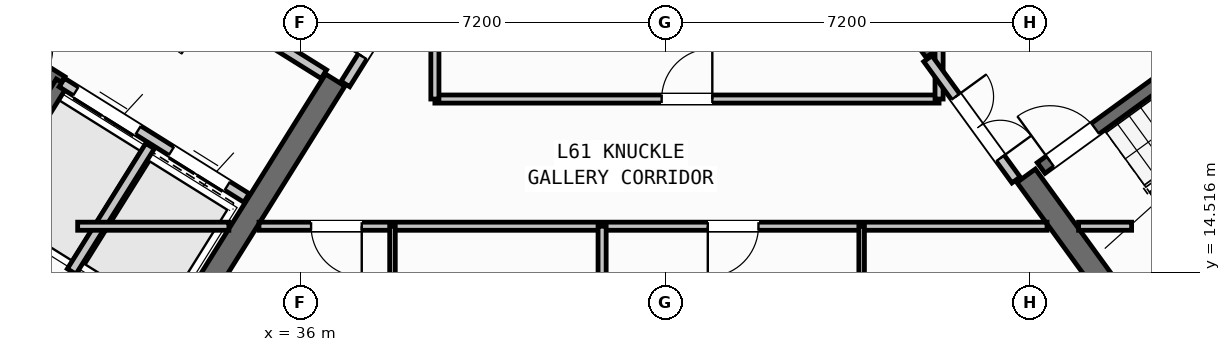
"""IFC4 building model, lengths in metres.
Left out: names, types, materials, properties, quantities, classifications, styles, units other than length and angle.
Written with IfcOpenShell. Run it as: python <this file> out.ifc"""

import sys

from ifc_helpers import new_model, si_unit, direction, frame, frame_2d, origin, place, context, subcontext, project, spatial, rectangle, extrude, source, transform, mapped, element, fill, save


model = new_model("IFC4")
c1 = context("Model", 3, precision=1e-05, world=origin(), true_north=direction((0.0, 1.0)))
c2 = subcontext(c1, "Body", "Model", "MODEL_VIEW")
j1 = project(units=[si_unit("LENGTHUNIT", "METRE"), si_unit("PLANEANGLEUNIT", "RADIAN")], contexts=[c1])
p1 = place(None, origin())
s1 = spatial("IfcSite", under=j1, at=p1, CompositionType="ELEMENT")
p2 = place(p1, origin())
s2 = spatial("IfcBuilding", under=s1, at=p2, CompositionType="ELEMENT")
p3 = place(p2, frame((0.0, 0.0, 242.1)))
s3 = spatial("IfcBuildingStorey", under=s2, at=p3, CompositionType="ELEMENT", Elevation=242.1)
p4 = place(p3, frame((33.324, 12.503, 0.0), z_axis=(0.0, 0.0, 1.0), x_axis=(-0.848043529849, 0.529926571782, 0.0)))
e1 = element("IfcWall", 1, at=p4, inside=s3, PredefinedType="SHEAR", context=c2, shape_type="SweptSolid", body=[
    extrude(rectangle(XDim=13.04, YDim=0.45, at=frame_2d((6.52, 0.0))), origin(), (0.0, 0.0, 1.0), 3.32),
])
p5 = place(p3, frame((36.683, 18.304, 0.0), z_axis=(0.0, 0.0, 1.0), x_axis=(-0.529904039071, -0.848057609704, 0.0)))
e2 = element("IfcWall", 2, at=p5, inside=s3, PredefinedType="SHEAR", context=c2, shape_type="SweptSolid", body=[
    extrude(rectangle(XDim=6.475, YDim=0.45, at=frame_2d((3.238, 0.0))), origin(), (0.0, 0.0, 1.0), 3.32),
])
p6 = place(p3, frame((52.399, 13.169, 0.0), z_axis=(0.0, 0.0, 1.0), x_axis=(0.809022352778, 0.587777877013, 0.0)))
e3 = element("IfcWall", 3, at=p6, inside=s3, PredefinedType="SHEAR", context=c2, shape_type="SweptSolid", body=[
    extrude(rectangle(XDim=12.24, YDim=0.45, at=frame_2d((6.12, 0.0))), origin(), (0.0, 0.0, 1.0), 3.32),
])
p7 = place(p3, frame((52.449, 13.483, 0.0), z_axis=(0.0, 0.0, 1.0), x_axis=(-0.587819244441, 0.808992296542, 0.0)))
e4 = element("IfcWall", 4, at=p7, inside=s3, PredefinedType="SHEAR", context=c2, shape_type="SweptSolid", body=[
    extrude(rectangle(XDim=3.625, YDim=0.45, at=frame_2d((1.812, 0.0))), origin(), (0.0, 0.0, 1.0), 3.32),
])
p8 = place(p3, frame((48.526, 18.884, 0.0), z_axis=(0.0, 0.0, 1.0), x_axis=(-0.587774812919, 0.809024578921, 0.0)))
e5 = element("IfcWall", 5, at=p8, inside=s3, PredefinedType="SHEAR", context=c2, shape_type="SweptSolid", body=[
    extrude(rectangle(XDim=6.475, YDim=0.45, at=frame_2d((3.238, 0.0))), origin(), (0.0, 0.0, 1.0), 3.32),
])
p9 = place(p3, frame((31.28, 18.261, 0.0), z_axis=(0.0, 0.0, 1.0), x_axis=(-0.848051618787, 0.529913626805, 0.0)))
e6 = element("IfcWall", 6, at=p9, inside=s3, PredefinedType="SHEAR", context=c2, shape_type="SweptSolid", body=[
    extrude(rectangle(XDim=7.46, YDim=0.26, at=frame_2d((3.73, 0.0))), origin(), (0.0, 0.0, 1.0), 3.32),
])
p10 = place(p9, frame((0.36, 0.0, 0.0)))
e7 = element("IfcOpeningElement", 7, at=p10, cuts=e6, PredefinedType="OPENING", context=c2, shape_type="SweptSolid", body=[
    extrude(rectangle(XDim=0.86, YDim=2.05, at=frame_2d((0.43, 1.025))), frame((0.0, 0.14, 0.0), z_axis=(0.0, -1.0, 0.0), x_axis=(1.0, 0.0, 0.0)), (0.0, 0.0, 1.0), 0.28),
])
p11 = place(p3, frame((31.288, 18.256, 0.0), z_axis=(0.0, 0.0, 1.0), x_axis=(-0.529943379326, -0.848033026897, 0.0)))
e8 = element("IfcWall", 8, at=p11, inside=s3, PredefinedType="SHEAR", context=c2, shape_type="SweptSolid", body=[
    extrude(rectangle(XDim=3.16, YDim=0.26, at=frame_2d((1.58, 0.0))), origin(), (0.0, 0.0, 1.0), 3.32),
])
p12 = place(p3, frame((34.933, 15.978, 0.0), z_axis=(0.0, 0.0, 1.0), x_axis=(-0.848055739377, 0.529907032327, 0.0)))
e9 = element("IfcWall", 9, at=p12, inside=s3, PredefinedType="STANDARD", context=c2, shape_type="SweptSolid", body=[
    extrude(rectangle(XDim=4.298, YDim=0.2, at=frame_2d((2.149, 0.0))), origin(), (0.0, 0.0, 1.0), 3.31),
])
p13 = place(p12, frame((0.448, 0.0, 0.0)))
e10 = element("IfcOpeningElement", 10, at=p13, cuts=e9, PredefinedType="OPENING", context=c2, shape_type="SweptSolid", body=[
    extrude(rectangle(XDim=1.3, YDim=2.2, at=frame_2d((0.65, 1.1))), frame((0.0, 0.11, 0.0), z_axis=(0.0, -1.0, 0.0), x_axis=(1.0, 0.0, 0.0)), (0.0, 0.0, 1.0), 0.22),
])
p14 = place(p12, frame((2.523, 0.0, 0.0)))
e11 = element("IfcOpeningElement", 11, at=p14, cuts=e9, PredefinedType="OPENING", context=c2, shape_type="SweptSolid", body=[
    extrude(rectangle(XDim=1.45, YDim=2.25, at=frame_2d((0.725, 1.125))), frame((0.0, 0.11, 0.0), z_axis=(0.0, -1.0, 0.0), x_axis=(1.0, 0.0, 0.0)), (0.0, 0.0, 1.0), 0.22),
])
p15 = place(p3, frame((36.459, 18.421, 0.0), z_axis=(0.0, 0.0, 1.0), x_axis=(-0.848059591691, 0.529900867089, 0.0)))
e12 = element("IfcWall", 12, at=p15, inside=s3, PredefinedType="STANDARD", context=c2, shape_type="SweptSolid", body=[
    extrude(rectangle(XDim=5.818, YDim=0.2, at=frame_2d((2.909, 0.0))), origin(), (0.0, 0.0, 1.0), 3.31),
])
p16 = place(p15, frame((2.598, 0.0, 0.0)))
e13 = element("IfcOpeningElement", 13, at=p16, cuts=e12, PredefinedType="OPENING", context=c2, shape_type="SweptSolid", body=[
    extrude(rectangle(XDim=1.15, YDim=2.1, at=frame_2d((0.575, 1.05))), frame((0.0, 0.11, 0.0), z_axis=(0.0, -1.0, 0.0), x_axis=(1.0, 0.0, 0.0)), (0.0, 0.0, 1.0), 0.22),
])
p17 = place(p3, frame((33.029, 17.003, 0.0), z_axis=(0.0, 0.0, 1.0), x_axis=(-0.529916267533, -0.848049968695, 0.0)))
e14 = element("IfcWall", 14, at=p17, inside=s3, PredefinedType="STANDARD", context=c2, shape_type="SweptSolid", body=[
    extrude(rectangle(XDim=2.92, YDim=0.2, at=frame_2d((1.46, 0.0))), origin(), (0.0, 0.0, 1.0), 3.31),
])
p18 = place(p3, frame((52.472, 14.013, 0.0), z_axis=(0.0, 0.0, 1.0), x_axis=(0.809028366311, 0.587769599847, 0.0)))
e15 = element("IfcWall", 15, at=p18, inside=s3, PredefinedType="SHEAR", context=c2, shape_type="SweptSolid", body=[
    extrude(rectangle(XDim=7.33, YDim=0.26, at=frame_2d((3.665, 0.0))), origin(), (0.0, 0.0, 1.0), 3.32),
])
p19 = place(p3, frame((50.615, 16.57, 0.0), z_axis=(0.0, 0.0, 1.0), x_axis=(0.809028366311, 0.587769599847, 0.0)))
e16 = element("IfcWall", 16, at=p19, inside=s3, PredefinedType="SHEAR", context=c2, shape_type="SweptSolid", body=[
    extrude(rectangle(XDim=7.33, YDim=0.26, at=frame_2d((3.665, 0.0))), origin(), (0.0, 0.0, 1.0), 3.32),
])
p20 = place(p19, frame((0.22, 0.0, 0.0)))
e17 = element("IfcOpeningElement", 17, at=p20, cuts=e16, PredefinedType="OPENING", context=c2, shape_type="SweptSolid", body=[
    extrude(rectangle(XDim=1.1, YDim=2.1, at=frame_2d((0.55, 1.05))), frame((0.0, 0.14, 0.0), z_axis=(0.0, -1.0, 0.0), x_axis=(1.0, 0.0, 0.0)), (0.0, 0.0, 1.0), 0.28),
])
p21 = place(p3, frame((32.164, 10.374, 0.0), z_axis=(0.0, 0.0, 1.0), x_axis=(-0.848044107957, 0.529925646633, 0.0)))
e18 = element("IfcWall", 18, at=p21, inside=s3, PredefinedType="PARTITIONING", context=c2, shape_type="SweptSolid", body=[
    extrude(rectangle(XDim=15.57, YDim=0.16, at=frame_2d((7.785, 0.0))), origin(), (0.0, 0.0, 1.0), 3.31),
])
p22 = place(p21, frame((10.83, 0.0, 0.0)))
e19 = element("IfcOpeningElement", 19, at=p22, cuts=e18, PredefinedType="OPENING", context=c2, shape_type="SweptSolid", body=[
    extrude(rectangle(XDim=1.0, YDim=2.1, at=frame_2d((0.5, 1.05))), frame((0.0, 0.09, 0.0), z_axis=(0.0, -1.0, 0.0), x_axis=(1.0, 0.0, 0.0)), (0.0, 0.0, 1.0), 0.18),
])
p23 = place(p3, frame((38.451, 20.737, 0.0), z_axis=(0.0, 0.0, 1.0), x_axis=(-0.529924799939, -0.848044637038, 0.0)))
e20 = element("IfcWall", 20, at=p23, inside=s3, PredefinedType="STANDARD", context=c2, shape_type="SweptSolid", body=[
    extrude(rectangle(XDim=2.96, YDim=0.2, at=frame_2d((1.48, 0.0))), origin(), (0.0, 0.0, 1.0), 3.31),
])
p24 = place(p23, frame((1.46, 0.0, 0.0)))
e21 = element("IfcOpeningElement", 21, at=p24, cuts=e20, PredefinedType="OPENING", context=c2, shape_type="SweptSolid", body=[
    extrude(rectangle(XDim=0.86, YDim=2.05, at=frame_2d((0.43, 1.025))), frame((0.0, 0.11, 0.0), z_axis=(0.0, -1.0, 0.0), x_axis=(1.0, 0.0, 0.0)), (0.0, 0.0, 1.0), 0.22),
])
p25 = place(p3, frame((31.6, 15.42, 0.0), z_axis=(0.0, 0.0, 1.0), x_axis=(1.0, 0.0, 0.0)))
e22 = element("IfcWall", 22, at=p25, inside=s3, PredefinedType="PARTITIONING", context=c2, shape_type="SweptSolid", body=[
    extrude(rectangle(XDim=2.984, YDim=0.16, at=frame_2d((1.492, 0.0))), origin(), (0.0, 0.0, 1.0), 3.31),
])
p26 = place(p3, frame((35.178, 15.42, 0.0), z_axis=(0.0, 0.0, 1.0), x_axis=(1.0, 0.0, 0.0)))
e23 = element("IfcWall", 23, at=p26, inside=s3, PredefinedType="PARTITIONING", context=c2, shape_type="SweptSolid", body=[
    extrude(rectangle(XDim=15.552, YDim=0.16, at=frame_2d((7.776, 0.0))), origin(), (0.0, 0.0, 1.0), 3.31),
])
p27 = place(p26, frame((1.028, 0.0, 0.0)))
e24 = element("IfcOpeningElement", 24, at=p27, cuts=e23, PredefinedType="OPENING", context=c2, shape_type="SweptSolid", body=[
    extrude(rectangle(XDim=1.0, YDim=2.1, at=frame_2d((0.5, 1.05))), frame((0.0, 0.09, 0.0), z_axis=(0.0, -1.0, 0.0), x_axis=(1.0, 0.0, 0.0)), (0.0, 0.0, 1.0), 0.18),
])
p28 = place(p26, frame((8.858, 0.0, 0.0)))
e25 = element("IfcOpeningElement", 25, at=p28, cuts=e23, PredefinedType="OPENING", context=c2, shape_type="SweptSolid", body=[
    extrude(rectangle(XDim=1.0, YDim=2.1, at=frame_2d((0.5, 1.05))), frame((0.0, 0.09, 0.0), z_axis=(0.0, -1.0, 0.0), x_axis=(1.0, 0.0, 0.0)), (0.0, 0.0, 1.0), 0.18),
])
p29 = place(p3, frame((51.354, 15.42, 0.0), z_axis=(0.0, 0.0, 1.0), x_axis=(1.0, 0.0, 0.0)))
e26 = element("IfcWall", 26, at=p29, inside=s3, PredefinedType="PARTITIONING", context=c2, shape_type="SweptSolid", body=[
    extrude(rectangle(XDim=1.046, YDim=0.16, at=frame_2d((0.523, 0.0))), origin(), (0.0, 0.0, 1.0), 3.31),
])
p30 = place(p3, frame((38.65, 17.93, 0.0), z_axis=(0.0, 0.0, 1.0), x_axis=(1.0, 0.0, 0.0)))
e27 = element("IfcWall", 27, at=p30, inside=s3, PredefinedType="PARTITIONING", context=c2, shape_type="SweptSolid", body=[
    extrude(rectangle(XDim=9.95, YDim=0.16, at=frame_2d((4.975, 0.0))), origin(), (0.0, 0.0, 1.0), 3.31),
])
p31 = place(p30, frame((4.475, 0.0, 0.0)))
e28 = element("IfcOpeningElement", 28, at=p31, cuts=e27, PredefinedType="OPENING", context=c2, shape_type="SweptSolid", body=[
    extrude(rectangle(XDim=1.0, YDim=2.1, at=frame_2d((0.5, 1.05))), frame((0.0, 0.09, 0.0), z_axis=(0.0, -1.0, 0.0), x_axis=(1.0, 0.0, 0.0)), (0.0, 0.0, 1.0), 0.18),
])
p32 = place(p3, frame((38.65, 17.93, 0.0), z_axis=(0.0, 0.0, 1.0), x_axis=(0.0, 1.0, 0.0)))
e29 = element("IfcWall", 29, at=p32, inside=s3, PredefinedType="PARTITIONING", context=c2, shape_type="SweptSolid", body=[
    extrude(rectangle(XDim=3.046, YDim=0.16, at=frame_2d((1.523, 0.0))), origin(), (0.0, 0.0, 1.0), 3.31),
])
p33 = place(p3, frame((48.6, 17.93, 0.0), z_axis=(0.0, 0.0, 1.0), x_axis=(0.0, 1.0, 0.0)))
e30 = element("IfcWall", 30, at=p33, inside=s3, PredefinedType="PARTITIONING", context=c2, shape_type="SweptSolid", body=[
    extrude(rectangle(XDim=0.993, YDim=0.16, at=frame_2d((0.496, 0.0))), origin(), (0.0, 0.0, 1.0), 3.31),
])
p34 = place(p3, frame((50.119, 16.333, 0.0), z_axis=(0.0, 0.0, 1.0), x_axis=(-0.587749856981, 0.809042709391, 0.0)))
e31 = element("IfcWall", 31, at=p34, inside=s3, PredefinedType="STANDARD", context=c2, shape_type="SweptSolid", body=[
    extrude(rectangle(XDim=2.96, YDim=0.2, at=frame_2d((1.48, 0.0))), origin(), (0.0, 0.0, 1.0), 3.31),
])
p35 = place(p34, frame((0.53, 0.0, 0.0)))
e32 = element("IfcOpeningElement", 32, at=p35, cuts=e31, PredefinedType="OPENING", context=c2, shape_type="SweptSolid", body=[
    extrude(rectangle(XDim=1.5, YDim=2.15, at=frame_2d((0.75, 1.075))), frame((0.0, 0.11, 0.0), z_axis=(0.0, -1.0, 0.0), x_axis=(1.0, 0.0, 0.0)), (0.0, 0.0, 1.0), 0.22),
])
p36 = place(p3, frame((41.95, 1.96, 0.0), z_axis=(0.0, 0.0, 1.0), x_axis=(0.0, 1.0, 0.0)))
e33 = element("IfcWall", 33, at=p36, inside=s3, PredefinedType="PARTITIONING", context=c2, shape_type="SweptSolid", body=[
    extrude(rectangle(XDim=13.46, YDim=0.16, at=frame_2d((6.73, 0.0))), origin(), (0.0, 0.0, 1.0), 3.31),
])
p37 = place(p3, frame((37.813, 1.96, 0.0), z_axis=(0.0, 0.0, 1.0), x_axis=(0.0, 1.0, 0.0)))
e34 = element("IfcWall", 34, at=p37, inside=s3, PredefinedType="PARTITIONING", context=c2, shape_type="SweptSolid", body=[
    extrude(rectangle(XDim=13.46, YDim=0.11, at=frame_2d((6.73, 0.0))), origin(), (0.0, 0.0, 1.0), 3.31),
])
p38 = place(p37, frame((5.5, 0.0, 0.0)))
e35 = element("IfcOpeningElement", 35, at=p38, cuts=e34, PredefinedType="OPENING", context=c2, shape_type="SweptSolid", body=[
    extrude(rectangle(XDim=0.92, YDim=2.08, at=frame_2d((0.46, 1.04))), frame((0.0, 0.065, 0.0), z_axis=(0.0, -1.0, 0.0), x_axis=(1.0, 0.0, 0.0)), (0.0, 0.0, 1.0), 0.13),
])
p39 = place(p37, frame((10.89, 0.0, 0.0)))
e36 = element("IfcOpeningElement", 36, at=p39, cuts=e34, PredefinedType="OPENING", context=c2, shape_type="SweptSolid", body=[
    extrude(rectangle(XDim=0.88, YDim=2.08, at=frame_2d((0.44, 1.04))), frame((0.0, 0.065, 0.0), z_axis=(0.0, -1.0, 0.0), x_axis=(1.0, 0.0, 0.0)), (0.0, 0.0, 1.0), 0.13),
])
p40 = place(p3, frame((47.072, 1.96, 0.0), z_axis=(0.0, 0.0, 1.0), x_axis=(0.0, 1.0, 0.0)))
e37 = element("IfcWall", 37, at=p40, inside=s3, PredefinedType="PARTITIONING", context=c2, shape_type="SweptSolid", body=[
    extrude(rectangle(XDim=13.46, YDim=0.11, at=frame_2d((6.73, 0.0))), origin(), (0.0, 0.0, 1.0), 3.31),
])
p41 = place(p40, frame((6.6, 0.0, 0.0)))
e38 = element("IfcOpeningElement", 38, at=p41, cuts=e37, PredefinedType="OPENING", context=c2, shape_type="SweptSolid", body=[
    extrude(rectangle(XDim=0.92, YDim=2.08, at=frame_2d((0.46, 1.04))), frame((0.0, 0.065, 0.0), z_axis=(0.0, -1.0, 0.0), x_axis=(1.0, 0.0, 0.0)), (0.0, 0.0, 1.0), 0.13),
])
p42 = place(p40, frame((11.54, 0.0, 0.0)))
e39 = element("IfcOpeningElement", 39, at=p42, cuts=e37, PredefinedType="OPENING", context=c2, shape_type="SweptSolid", body=[
    extrude(rectangle(XDim=0.88, YDim=2.08, at=frame_2d((0.44, 1.04))), frame((0.0, 0.065, 0.0), z_axis=(0.0, -1.0, 0.0), x_axis=(1.0, 0.0, 0.0)), (0.0, 0.0, 1.0), 0.13),
])
m1 = source(origin(), c2, "Body", "SweptSolid", [
    extrude(rectangle(XDim=1.3, YDim=2.2, at=frame_2d((0.65, 1.1))), frame((0.0, 0.025, 0.0), z_axis=(0.0, -1.0, 0.0), x_axis=(1.0, 0.0, 0.0)), (0.0, 0.0, 1.0), 0.05),
])
p43 = place(p13, origin())
e40 = element("IfcDoor", 40, at=p43, inside=s3, OperationType="DOUBLE_DOOR_SLIDING", PredefinedType="DOOR", context=c2, shape_type="MappedRepresentation", body=[
    mapped(m1, transform((0.0, 0.0, 0.0), scale=1.0)),
])
fill(e10, e40)
m2 = source(origin(), c2, "Body", "SweptSolid", [
    extrude(rectangle(XDim=1.45, YDim=2.25, at=frame_2d((0.725, 1.125))), frame((0.0, 0.025, 0.0), z_axis=(0.0, -1.0, 0.0), x_axis=(1.0, 0.0, 0.0)), (0.0, 0.0, 1.0), 0.05),
])
p44 = place(p14, origin())
e41 = element("IfcDoor", 41, at=p44, inside=s3, OperationType="DOUBLE_DOOR_SLIDING", PredefinedType="DOOR", context=c2, shape_type="MappedRepresentation", body=[
    mapped(m2, transform((0.0, 0.0, 0.0), scale=1.0)),
])
fill(e11, e41)
m3 = source(origin(), c2, "Body", "SweptSolid", [
    extrude(rectangle(XDim=1.1, YDim=2.1, at=frame_2d((0.55, 1.05))), frame((0.0, 0.025, 0.0), z_axis=(0.0, -1.0, 0.0), x_axis=(1.0, 0.0, 0.0)), (0.0, 0.0, 1.0), 0.05),
])
p45 = place(p20, origin())
e42 = element("IfcDoor", 42, at=p45, inside=s3, OperationType="SINGLE_SWING_LEFT", PredefinedType="DOOR", context=c2, shape_type="MappedRepresentation", body=[
    mapped(m3, transform((0.0, 0.0, 0.0), scale=1.0)),
])
fill(e17, e42)
m4 = source(origin(), c2, "Body", "SweptSolid", [
    extrude(rectangle(XDim=1.0, YDim=2.1, at=frame_2d((0.5, 1.05))), frame((0.0, 0.025, 0.0), z_axis=(0.0, -1.0, 0.0), x_axis=(1.0, 0.0, 0.0)), (0.0, 0.0, 1.0), 0.05),
])
p46 = place(p31, origin())
e43 = element("IfcDoor", 43, at=p46, inside=s3, OperationType="SINGLE_SWING_RIGHT", PredefinedType="DOOR", context=c2, shape_type="MappedRepresentation", body=[
    mapped(m4, transform((0.0, 0.0, 0.0), scale=1.0)),
])
fill(e28, e43)
m5 = source(origin(), c2, "Body", "SweptSolid", [
    extrude(rectangle(XDim=0.86, YDim=2.05, at=frame_2d((0.43, 1.025))), frame((0.0, 0.025, 0.0), z_axis=(0.0, -1.0, 0.0), x_axis=(1.0, 0.0, 0.0)), (0.0, 0.0, 1.0), 0.05),
])
p47 = place(p24, frame((0.86, 0.0, 0.0), z_axis=(0.0, 0.0, 1.0), x_axis=(-1.0, 0.0, 0.0)))
e44 = element("IfcDoor", 44, at=p47, inside=s3, OperationType="SINGLE_SWING_LEFT", PredefinedType="DOOR", context=c2, shape_type="MappedRepresentation", body=[
    mapped(m5, transform((0.0, 0.0, 0.0), scale=1.0)),
])
fill(e21, e44)
m6 = source(origin(), c2, "Body", "SweptSolid", [
    extrude(rectangle(XDim=1.5, YDim=2.15, at=frame_2d((0.75, 1.075))), frame((0.0, 0.025, 0.0), z_axis=(0.0, -1.0, 0.0), x_axis=(1.0, 0.0, 0.0)), (0.0, 0.0, 1.0), 0.05),
])
p48 = place(p35, frame((1.5, 0.0, 0.0), z_axis=(0.0, 0.0, 1.0), x_axis=(-1.0, 0.0, 0.0)))
e45 = element("IfcDoor", 45, at=p48, inside=s3, OperationType="DOUBLE_DOOR_SINGLE_SWING", PredefinedType="DOOR", context=c2, shape_type="MappedRepresentation", body=[
    mapped(m6, transform((0.0, 0.0, 0.0), scale=1.0)),
])
fill(e32, e45)
p49 = place(p27, frame((1.0, 0.0, 0.0), z_axis=(0.0, 0.0, 1.0), x_axis=(-1.0, 0.0, 0.0)))
e46 = element("IfcDoor", 46, at=p49, inside=s3, OperationType="SINGLE_SWING_LEFT", PredefinedType="DOOR", context=c2, shape_type="MappedRepresentation", body=[
    mapped(m4, transform((0.0, 0.0, 0.0), scale=1.0)),
])
fill(e24, e46)
p50 = place(p28, frame((1.0, 0.0, 0.0), z_axis=(0.0, 0.0, 1.0), x_axis=(-1.0, 0.0, 0.0)))
e47 = element("IfcDoor", 47, at=p50, inside=s3, OperationType="SINGLE_SWING_RIGHT", PredefinedType="DOOR", context=c2, shape_type="MappedRepresentation", body=[
    mapped(m4, transform((0.0, 0.0, 0.0), scale=1.0)),
])
fill(e25, e47)
save(model, sys.argv[1])
